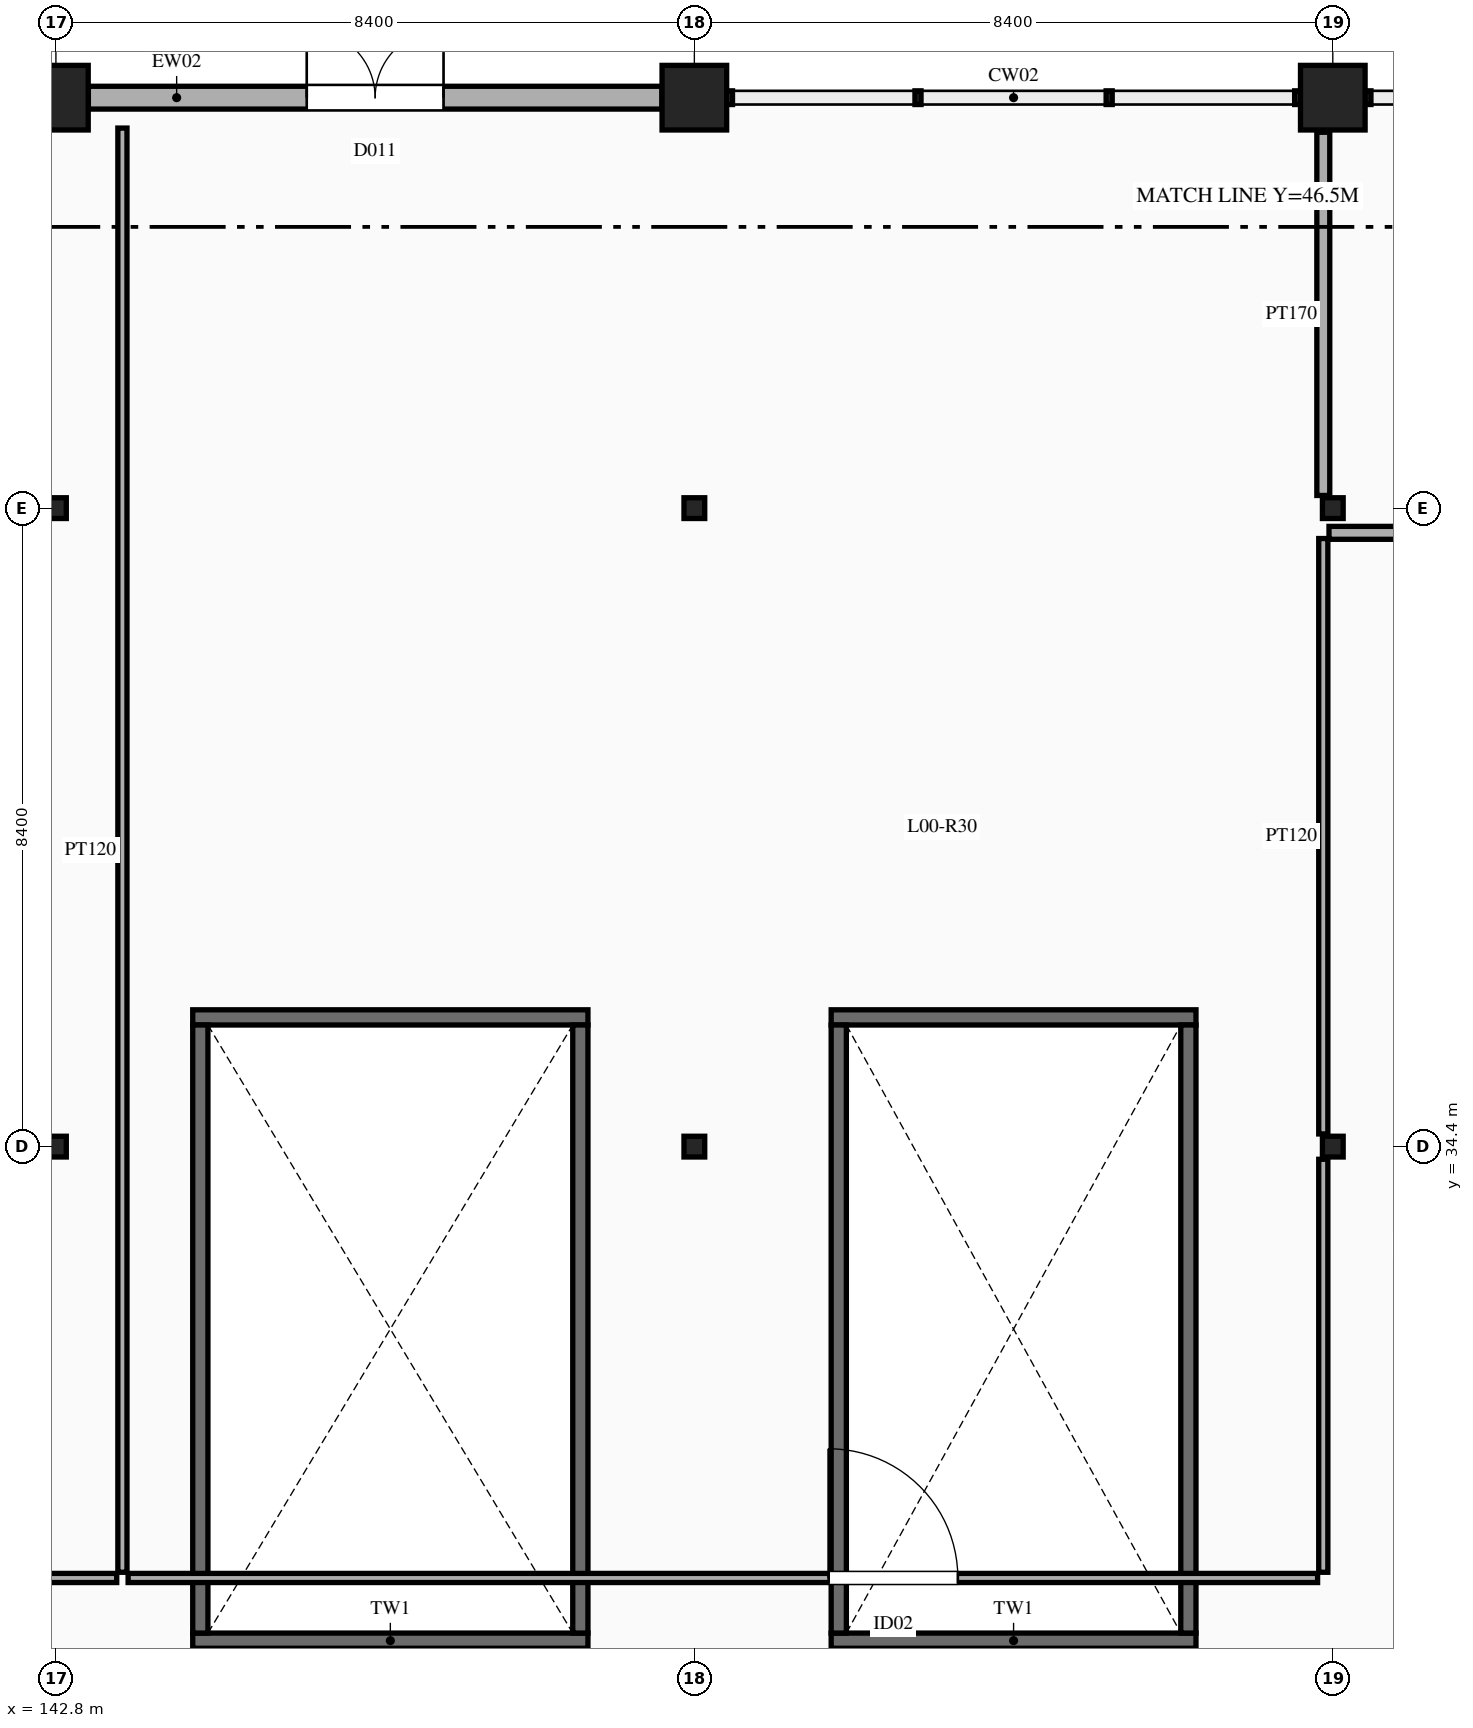
"""IFC4 building model, lengths in metres.
Left out: names, types, materials, properties, quantities, classifications, styles, units other than length and angle.
Written with IfcOpenShell. Run it as: python <this file> out.ifc"""

import sys

from ifc_helpers import new_model, si_unit, direction, frame, frame_2d, origin, origin_2d, place, context, subcontext, project, spatial, rectangle, hollow_circle, extrude, element, fill, save


model = new_model("IFC4")
c1 = context("Model", 3, precision=1e-05, world=origin(), true_north=direction((0.0, 1.0)))
c2 = subcontext(c1, "Body", "Model", "MODEL_VIEW")
j1 = project(units=[si_unit("LENGTHUNIT", "METRE"), si_unit("PLANEANGLEUNIT", "RADIAN")], contexts=[c1])
p1 = place(None, origin())
s1 = spatial("IfcSite", under=j1, at=p1, CompositionType="ELEMENT")
p2 = place(p1, origin())
s2 = spatial("IfcBuilding", under=s1, at=p2, CompositionType="ELEMENT")
p3 = place(p2, origin())
s3 = spatial("IfcBuildingStorey", under=s2, at=p3, CompositionType="ELEMENT", Elevation=0.0)
for number, where, z_axis, x_axis in (
    (1, (142.8, 48.2, 0.0), (0.0, 0.0, 1.0), (1.0, 0.0, 0.0)),
    (2, (151.2, 48.2, 0.0), (0.0, 0.0, 1.0), (1.0, 0.0, 0.0)),
    (3, (159.6, 48.2, 0.0), (0.0, 0.0, 1.0), (1.0, 0.0, 0.0)),
):
    element("IfcColumn", number, at=place(p3, frame(where, z_axis=z_axis, x_axis=x_axis)), inside=s3, PredefinedType="COLUMN", context=c2, shape_type="SweptSolid", body=[
        extrude(rectangle(XDim=0.85, YDim=0.85, at=origin_2d()), origin(), (0.0, 0.0, 1.0), 5.4),
    ])
for number, where, z_axis, x_axis in (
    (4, (142.8, 34.4, 0.0), (0.0, 0.0, 1.0), (1.0, 0.0, 0.0)),
    (5, (142.8, 42.8, 0.0), (0.0, 0.0, 1.0), (1.0, 0.0, 0.0)),
    (6, (151.2, 34.4, 0.0), (0.0, 0.0, 1.0), (1.0, 0.0, 0.0)),
    (7, (151.2, 42.8, 0.0), (0.0, 0.0, 1.0), (1.0, 0.0, 0.0)),
    (8, (159.6, 34.4, 0.0), (0.0, 0.0, 1.0), (1.0, 0.0, 0.0)),
    (9, (159.6, 42.8, 0.0), (0.0, 0.0, 1.0), (1.0, 0.0, 0.0)),
):
    element("IfcColumn", number, at=place(p3, frame(where, z_axis=z_axis, x_axis=x_axis)), inside=s3, PredefinedType="COLUMN", context=c2, shape_type="SweptSolid", body=[
        extrude(hollow_circle(Radius=0.136, WallThickness=0.01, at=origin_2d()), origin(), (0.0, 0.0, 1.0), 5.2),
    ])
for number, where, z_axis, x_axis in (
    (10, (144.6, 27.9, -0.45), (0.0, 0.0, 1.0), (1.0, 0.0, 0.0)),
    (11, (144.6, 36.1, -0.45), (0.0, 0.0, 1.0), (1.0, 0.0, 0.0)),
):
    element("IfcWall", number, at=place(p3, frame(where, z_axis=z_axis, x_axis=x_axis)), inside=s3, PredefinedType="SOLIDWALL", context=c2, shape_type="SweptSolid", body=[
        extrude(rectangle(XDim=5.2, YDim=0.2, at=frame_2d((2.6, 0.0))), origin(), (0.0, 0.0, 1.0), 0.23),
    ])
for number, where, z_axis, x_axis in (
    (12, (144.7, 28.0, -0.45), (0.0, 0.0, 1.0), (0.0, 1.0, 0.0)),
    (13, (149.7, 28.0, -0.45), (0.0, 0.0, 1.0), (0.0, 1.0, 0.0)),
):
    element("IfcWall", number, at=place(p3, frame(where, z_axis=z_axis, x_axis=x_axis)), inside=s3, PredefinedType="SOLIDWALL", context=c2, shape_type="SweptSolid", body=[
        extrude(rectangle(XDim=8.0, YDim=0.2, at=frame_2d((4.0, 0.0))), origin(), (0.0, 0.0, 1.0), 0.23),
    ])
for number, where, z_axis, x_axis in (
    (14, (153.0, 27.9, -0.45), (0.0, 0.0, 1.0), (1.0, 0.0, 0.0)),
    (15, (153.0, 36.1, -0.45), (0.0, 0.0, 1.0), (1.0, 0.0, 0.0)),
):
    element("IfcWall", number, at=place(p3, frame(where, z_axis=z_axis, x_axis=x_axis)), inside=s3, PredefinedType="SOLIDWALL", context=c2, shape_type="SweptSolid", body=[
        extrude(rectangle(XDim=4.8, YDim=0.2, at=frame_2d((2.4, 0.0))), origin(), (0.0, 0.0, 1.0), 0.23),
    ])
for number, where, z_axis, x_axis in (
    (16, (153.1, 28.0, -0.45), (0.0, 0.0, 1.0), (0.0, 1.0, 0.0)),
    (17, (157.7, 28.0, -0.45), (0.0, 0.0, 1.0), (0.0, 1.0, 0.0)),
):
    element("IfcWall", number, at=place(p3, frame(where, z_axis=z_axis, x_axis=x_axis)), inside=s3, PredefinedType="SOLIDWALL", context=c2, shape_type="SweptSolid", body=[
        extrude(rectangle(XDim=8.0, YDim=0.2, at=frame_2d((4.0, 0.0))), origin(), (0.0, 0.0, 1.0), 0.23),
    ])
p4 = place(p3, frame((143.227, 48.2, 0.0), z_axis=(0.0, 0.0, 1.0), x_axis=(1.0, 0.0, 0.0)))
e18 = element("IfcWall", 18, at=p4, inside=s3, PredefinedType="SOLIDWALL", context=c2, shape_type="SweptSolid", body=[
    extrude(rectangle(XDim=7.546, YDim=0.3, at=frame_2d((3.773, 0.0))), origin(), (0.0, 0.0, 1.0), 4.45),
])
p5 = place(p4, frame((2.873, 0.0, 0.0)))
e19 = element("IfcOpeningElement", 19, at=p5, cuts=e18, PredefinedType="OPENING", context=c2, shape_type="SweptSolid", body=[
    extrude(rectangle(XDim=1.8, YDim=2.4, at=frame_2d((0.9, 1.2))), frame((0.0, 0.16, 0.0), z_axis=(0.0, -1.0, 0.0), x_axis=(1.0, 0.0, 0.0)), (0.0, 0.0, 1.0), 0.32),
])
p6 = place(p3, frame((121.2, 28.725, 0.0), z_axis=(0.0, 0.0, 1.0), x_axis=(1.0, 0.0, 0.0)))
e20 = element("IfcWall", 20, at=p6, inside=s3, PredefinedType="PARTITIONING", context=c2, shape_type="SweptSolid", body=[
    extrude(rectangle(XDim=22.4, YDim=0.12, at=frame_2d((11.2, 0.0))), origin(), (0.0, 0.0, 1.0), 4.35),
])
p7 = place(p6, frame((9.826, 0.0, 0.0)))
e21 = element("IfcOpeningElement", 21, at=p7, cuts=e20, PredefinedType="OPENING", context=c2, shape_type="SweptSolid", body=[
    extrude(rectangle(XDim=1.7, YDim=2.4, at=frame_2d((0.85, 1.2))), frame((0.0, 0.07, 0.0), z_axis=(0.0, -1.0, 0.0), x_axis=(1.0, 0.0, 0.0)), (0.0, 0.0, 1.0), 0.14),
])
p8 = place(p3, frame((143.75, 28.725, 0.0), z_axis=(0.0, 0.0, 1.0), x_axis=(1.0, 0.0, 0.0)))
e22 = element("IfcWall", 22, at=p8, inside=s3, PredefinedType="PARTITIONING", context=c2, shape_type="SweptSolid", body=[
    extrude(rectangle(XDim=15.65, YDim=0.12, at=frame_2d((7.825, 0.0))), origin(), (0.0, 0.0, 1.0), 4.35),
])
p9 = place(p8, frame((9.217, 0.0, 0.0)))
e23 = element("IfcOpeningElement", 23, at=p9, cuts=e22, PredefinedType="OPENING", context=c2, shape_type="SweptSolid", body=[
    extrude(rectangle(XDim=1.7, YDim=2.4, at=frame_2d((0.85, 1.2))), frame((0.0, 0.07, 0.0), z_axis=(0.0, -1.0, 0.0), x_axis=(1.0, 0.0, 0.0)), (0.0, 0.0, 1.0), 0.14),
])
p10 = place(p3, frame((159.475, 28.8, 0.0), z_axis=(0.0, 0.0, 1.0), x_axis=(0.0, 1.0, 0.0)))
e24 = element("IfcWall", 24, at=p10, inside=s3, PredefinedType="PARTITIONING", context=c2, shape_type="SweptSolid", body=[
    extrude(rectangle(XDim=5.433, YDim=0.12, at=frame_2d((2.717, 0.0))), origin(), (0.0, 0.0, 1.0), 4.35),
])
p11 = place(p3, frame((159.475, 34.566, 0.0), z_axis=(0.0, 0.0, 1.0), x_axis=(0.0, 1.0, 0.0)))
e25 = element("IfcWall", 25, at=p11, inside=s3, PredefinedType="PARTITIONING", context=c2, shape_type="SweptSolid", body=[
    extrude(rectangle(XDim=7.833, YDim=0.12, at=frame_2d((3.917, 0.0))), origin(), (0.0, 0.0, 1.0), 4.35),
])
p12 = place(p3, frame((159.55, 42.475, 0.0), z_axis=(0.0, 0.0, 1.0), x_axis=(1.0, 0.0, 0.0)))
e26 = element("IfcWall", 26, at=p12, inside=s3, PredefinedType="PARTITIONING", context=c2, shape_type="SweptSolid", body=[
    extrude(rectangle(XDim=2.7, YDim=0.17, at=frame_2d((1.35, 0.0))), origin(), (0.0, 0.0, 1.0), 4.35),
])
p13 = place(p12, frame((1.51, 0.0, 0.0)))
e27 = element("IfcOpeningElement", 27, at=p13, cuts=e26, PredefinedType="OPENING", context=c2, shape_type="SweptSolid", body=[
    extrude(rectangle(XDim=0.94, YDim=2.1, at=frame_2d((0.47, 1.05))), frame((0.0, 0.095, 0.0), z_axis=(0.0, -1.0, 0.0), x_axis=(1.0, 0.0, 0.0)), (0.0, 0.0, 1.0), 0.19),
])
p14 = place(p3, frame((143.675, 28.8, 0.0), z_axis=(0.0, 0.0, 1.0), x_axis=(0.0, 1.0, 0.0)))
e28 = element("IfcWall", 28, at=p14, inside=s3, PredefinedType="PARTITIONING", context=c2, shape_type="SweptSolid", body=[
    extrude(rectangle(XDim=19.0, YDim=0.12, at=frame_2d((9.5, 0.0))), origin(), (0.0, 0.0, 1.0), 4.35),
])
p15 = place(p3, frame((159.475, 42.967, 0.0), z_axis=(0.0, 0.0, 1.0), x_axis=(0.0, 1.0, 0.0)))
e29 = element("IfcWall", 29, at=p15, inside=s3, PredefinedType="PARTITIONING", context=c2, shape_type="SweptSolid", body=[
    extrude(rectangle(XDim=4.779, YDim=0.17, at=frame_2d((2.389, 0.0))), origin(), (0.0, 0.0, 1.0), 4.35),
])
p16 = place(p5, origin())
e30 = element("IfcDoor", 30, at=p16, inside=s3, OperationType="DOUBLE_DOOR_SINGLE_SWING", PredefinedType="DOOR", context=c2, shape_type="SweptSolid", body=[
    extrude(rectangle(XDim=1.8, YDim=2.4, at=frame_2d((0.9, 1.2))), frame((0.0, 0.025, 0.0), z_axis=(0.0, -1.0, 0.0), x_axis=(1.0, 0.0, 0.0)), (0.0, 0.0, 1.0), 0.05),
])
fill(e19, e30)
p17 = place(p9, origin())
e31 = element("IfcDoor", 31, at=p17, inside=s3, OperationType="SINGLE_SWING_LEFT", PredefinedType="DOOR", context=c2, shape_type="SweptSolid", body=[
    extrude(rectangle(XDim=1.7, YDim=2.4, at=frame_2d((0.85, 1.2))), frame((0.0, 0.025, 0.0), z_axis=(0.0, -1.0, 0.0), x_axis=(1.0, 0.0, 0.0)), (0.0, 0.0, 1.0), 0.05),
])
fill(e23, e31)
save(model, sys.argv[1])
